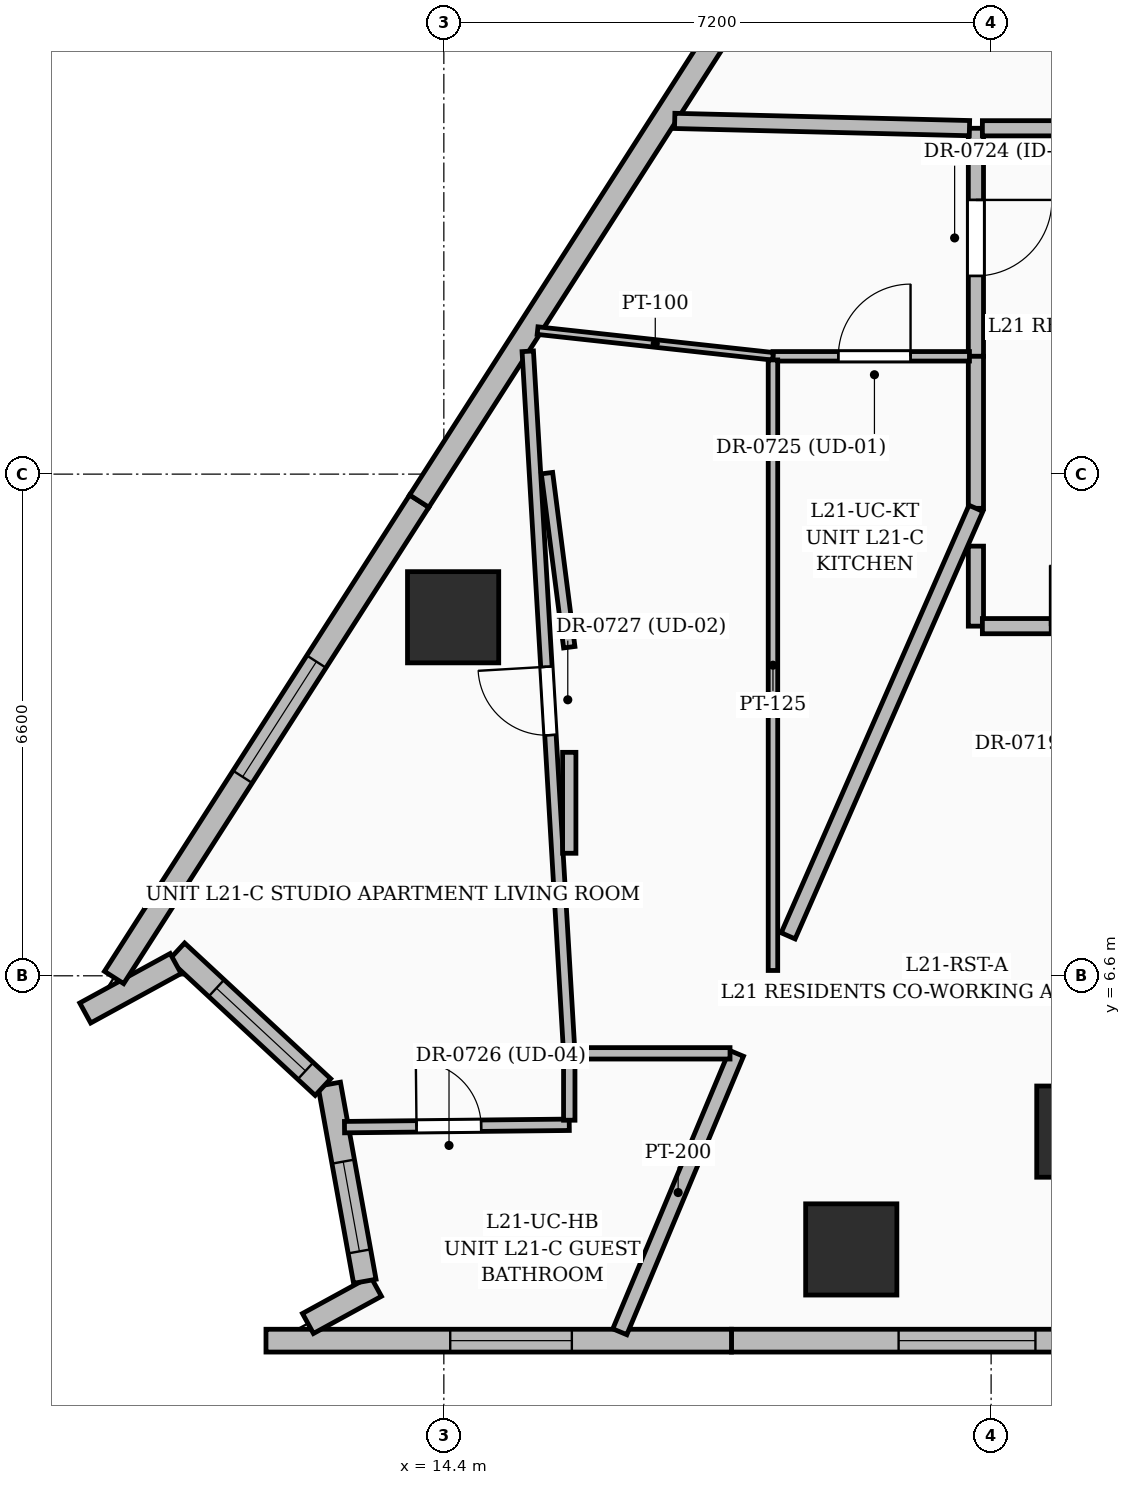
"""IFC4 building model, lengths in metres.
Left out: names, types, materials, properties, quantities, classifications, styles, units other than length and angle.
Written with IfcOpenShell. Run it as: python <this file> out.ifc"""

import sys

from ifc_helpers import new_model, si_unit, direction, frame, frame_2d, origin, origin_2d, place, context, subcontext, project, spatial, rectangle, extrude, element, fill, save


model = new_model("IFC4")
c1 = context("Model", 3, precision=1e-05, world=origin(), true_north=direction((0.0, 1.0)))
c2 = subcontext(c1, "Body", "Model", "MODEL_VIEW")
j1 = project(units=[si_unit("LENGTHUNIT", "METRE"), si_unit("PLANEANGLEUNIT", "RADIAN")], contexts=[c1])
p1 = place(None, origin())
s1 = spatial("IfcSite", under=j1, at=p1, CompositionType="ELEMENT")
p2 = place(p1, origin())
s2 = spatial("IfcBuilding", under=s1, at=p2, CompositionType="ELEMENT")
p3 = place(p2, frame((0.0, 0.0, 85.8)))
s3 = spatial("IfcBuildingStorey", under=s2, at=p3, CompositionType="ELEMENT", Elevation=85.8)
for number, where, z_axis, x_axis in (
    (1, (22.8, 4.55, 0.0), (0.0, 0.0, 1.0), (1.0, 0.0, 0.0)),
    (2, (19.76, 3.0, 0.0), (0.0, 0.0, 1.0), (1.0, 0.0, 0.0)),
    (3, (14.522, 11.317, 0.0), (0.0, 0.0, 1.0), (1.0, 0.0, 0.0)),
):
    element("IfcColumn", number, at=place(p3, frame(where, z_axis=z_axis, x_axis=x_axis)), inside=s3, PredefinedType="COLUMN", context=c2, shape_type="SweptSolid", body=[
        extrude(rectangle(XDim=1.2, YDim=1.2, at=origin_2d()), origin(), (0.0, 0.0, 1.0), 3.6),
    ])
p4 = place(p3, frame((24.308, 1.8, 0.0), z_axis=(0.0, 0.0, 1.0), x_axis=(-1.0, 0.0, 0.0)))
e4 = element("IfcWall", 4, at=p4, inside=s3, PredefinedType="SOLIDWALL", context=c2, shape_type="SweptSolid", body=[
    extrude(rectangle(XDim=6.124, YDim=0.3, at=frame_2d((3.062, 0.0))), origin(), (0.0, 0.0, 1.0), 3.35),
])
p5 = place(p4, frame((2.125, 0.0, 0.6)))
e5 = element("IfcOpeningElement", 5, at=p5, cuts=e4, PredefinedType="OPENING", context=c2, shape_type="SweptSolid", body=[
    extrude(rectangle(XDim=1.8, YDim=2.1, at=frame_2d((0.9, 1.05))), frame((0.0, 0.16, 0.0), z_axis=(0.0, -1.0, 0.0), x_axis=(1.0, 0.0, 0.0)), (0.0, 0.0, 1.0), 0.32),
])
p6 = place(p3, frame((18.184, 1.8, 0.0), z_axis=(0.0, 0.0, 1.0), x_axis=(-1.0, 0.0, 0.0)))
e6 = element("IfcWall", 6, at=p6, inside=s3, PredefinedType="SOLIDWALL", context=c2, shape_type="SweptSolid", body=[
    extrude(rectangle(XDim=6.124, YDim=0.3, at=frame_2d((3.062, 0.0))), origin(), (0.0, 0.0, 1.0), 3.35),
])
p7 = place(p6, frame((2.1, 0.0, 0.55)))
e7 = element("IfcOpeningElement", 7, at=p7, cuts=e6, PredefinedType="OPENING", context=c2, shape_type="SweptSolid", body=[
    extrude(rectangle(XDim=1.6, YDim=2.2, at=frame_2d((0.8, 1.1))), frame((0.0, 0.16, 0.0), z_axis=(0.0, -1.0, 0.0), x_axis=(1.0, 0.0, 0.0)), (0.0, 0.0, 1.0), 0.32),
])
p8 = place(p3, frame((12.612, 2.026, 0.0), z_axis=(0.0, 0.0, 1.0), x_axis=(0.877245120991, 0.480042704036, 0.0)))
e8 = element("IfcWall", 8, at=p8, inside=s3, PredefinedType="SOLIDWALL", context=c2, shape_type="SweptSolid", body=[
    extrude(rectangle(XDim=1.02, YDim=0.3, at=frame_2d((0.51, 0.0))), origin(), (0.0, 0.0, 1.0), 3.35),
])
p9 = place(p3, frame((13.36, 2.581, 0.0), z_axis=(0.0, 0.0, 1.0), x_axis=(-0.177621463404, 0.984098885142, 0.0)))
e9 = element("IfcWall", 9, at=p9, inside=s3, PredefinedType="SOLIDWALL", context=c2, shape_type="SweptSolid", body=[
    extrude(rectangle(XDim=2.635, YDim=0.3, at=frame_2d((1.317, 0.0))), origin(), (0.0, 0.0, 1.0), 3.35),
])
p10 = place(p9, frame((0.4, 0.0, 0.8)))
e10 = element("IfcOpeningElement", 10, at=p10, cuts=e9, PredefinedType="OPENING", context=c2, shape_type="SweptSolid", body=[
    extrude(rectangle(XDim=1.2, YDim=1.8, at=frame_2d((0.6, 0.9))), frame((0.0, 0.16, 0.0), z_axis=(0.0, -1.0, 0.0), x_axis=(1.0, 0.0, 0.0)), (0.0, 0.0, 1.0), 0.32),
])
p11 = place(p3, frame((12.809, 5.136, 0.0), z_axis=(0.0, 0.0, 1.0), x_axis=(-0.732640992678, 0.680615292105, 0.0)))
e11 = element("IfcWall", 11, at=p11, inside=s3, PredefinedType="SOLIDWALL", context=c2, shape_type="SweptSolid", body=[
    extrude(rectangle(XDim=2.623, YDim=0.3, at=frame_2d((1.312, 0.0))), origin(), (0.0, 0.0, 1.0), 3.35),
])
p12 = place(p11, frame((0.313, 0.0, 0.55)))
e12 = element("IfcOpeningElement", 12, at=p12, cuts=e11, PredefinedType="OPENING", context=c2, shape_type="SweptSolid", body=[
    extrude(rectangle(XDim=1.6, YDim=2.2, at=frame_2d((0.8, 1.1))), frame((0.0, 0.16, 0.0), z_axis=(0.0, -1.0, 0.0), x_axis=(1.0, 0.0, 0.0)), (0.0, 0.0, 1.0), 0.32),
])
p13 = place(p3, frame((10.872, 6.761, 0.0), z_axis=(0.0, 0.0, 1.0), x_axis=(-0.877399567967, -0.479760354898, 0.0)))
e13 = element("IfcWall", 13, at=p13, inside=s3, PredefinedType="SOLIDWALL", context=c2, shape_type="SweptSolid", body=[
    extrude(rectangle(XDim=1.356, YDim=0.3, at=frame_2d((0.678, 0.0))), origin(), (0.0, 0.0, 1.0), 3.35),
])
p14 = place(p3, frame((10.061, 6.578, 0.0), z_axis=(0.0, 0.0, 1.0), x_axis=(0.539445524224, 0.84202050236, 0.0)))
e14 = element("IfcWall", 14, at=p14, inside=s3, PredefinedType="SOLIDWALL", context=c2, shape_type="SweptSolid", body=[
    extrude(rectangle(XDim=7.443, YDim=0.3, at=frame_2d((3.721, 0.0))), origin(), (0.0, 0.0, 1.0), 3.35),
])
p15 = place(p14, frame((3.135, 0.0, 0.6)))
e15 = element("IfcOpeningElement", 15, at=p15, cuts=e14, PredefinedType="OPENING", context=c2, shape_type="SweptSolid", body=[
    extrude(rectangle(XDim=1.8, YDim=2.1, at=frame_2d((0.9, 1.05))), frame((0.0, 0.16, 0.0), z_axis=(0.0, -1.0, 0.0), x_axis=(1.0, 0.0, 0.0)), (0.0, 0.0, 1.0), 0.32),
])
p16 = place(p3, frame((14.076, 12.845, 0.0), z_axis=(0.0, 0.0, 1.0), x_axis=(0.539449144613, 0.842018182925, 0.0)))
e16 = element("IfcWall", 16, at=p16, inside=s3, PredefinedType="SOLIDWALL", context=c2, shape_type="SweptSolid", body=[
    extrude(rectangle(XDim=8.058, YDim=0.3, at=frame_2d((4.029, 0.0))), origin(), (0.0, 0.0, 1.0), 3.35),
])
p17 = place(p3, frame((21.4, 12.253, 0.0), z_axis=(0.0, 0.0, 1.0), x_axis=(0.0, -1.0, 0.0)))
e17 = element("IfcWall", 17, at=p17, inside=s3, PredefinedType="PARTITIONING", context=c2, shape_type="SweptSolid", body=[
    extrude(rectangle(XDim=1.053, YDim=0.2, at=frame_2d((0.526, 0.0))), origin(), (0.0, 0.0, 1.0), 3.35),
])
p18 = place(p3, frame((21.485, 11.2, 0.0), z_axis=(0.0, 0.0, 1.0), x_axis=(1.0, 0.0, 0.0)))
e18 = element("IfcWall", 18, at=p18, inside=s3, PredefinedType="PARTITIONING", context=c2, shape_type="SweptSolid", body=[
    extrude(rectangle(XDim=3.384, YDim=0.2, at=frame_2d((1.692, 0.0))), origin(), (0.0, 0.0, 1.0), 3.35),
])
p19 = place(p18, frame((0.89, 0.0, 0.0)))
e19 = element("IfcOpeningElement", 19, at=p19, cuts=e18, PredefinedType="OPENING", context=c2, shape_type="SweptSolid", body=[
    extrude(rectangle(XDim=1.6, YDim=2.3, at=frame_2d((0.8, 1.15))), frame((0.0, 0.11, 0.0), z_axis=(0.0, -1.0, 0.0), x_axis=(1.0, 0.0, 0.0)), (0.0, 0.0, 1.0), 0.22),
])
p20 = place(p3, frame((21.4, 17.75, 0.0), z_axis=(0.0, 0.0, 1.0), x_axis=(0.0, -1.0, 0.0)))
e20 = element("IfcWall", 20, at=p20, inside=s3, PredefinedType="PARTITIONING", context=c2, shape_type="SweptSolid", body=[
    extrude(rectangle(XDim=3.0, YDim=0.2, at=frame_2d((1.5, 0.0))), origin(), (0.0, 0.0, 1.0), 2.712),
])
p21 = place(p20, frame((0.943, 0.0, 0.0)))
e21 = element("IfcOpeningElement", 21, at=p21, cuts=e20, PredefinedType="OPENING", context=c2, shape_type="SweptSolid", body=[
    extrude(rectangle(XDim=1.0, YDim=2.2, at=frame_2d((0.5, 1.1))), frame((0.0, 0.11, 0.0), z_axis=(0.0, -1.0, 0.0), x_axis=(1.0, 0.0, 0.0)), (0.0, 0.0, 1.0), 0.22),
])
p22 = place(p3, frame((21.4, 14.75, 0.0), z_axis=(0.0, 0.0, 1.0), x_axis=(0.0, -1.0, 0.0)))
e22 = element("IfcWall", 22, at=p22, inside=s3, PredefinedType="PARTITIONING", context=c2, shape_type="SweptSolid", body=[
    extrude(rectangle(XDim=2.0, YDim=0.2, at=frame_2d((1.0, 0.0))), origin(), (0.0, 0.0, 1.0), 2.712),
])
p23 = place(p3, frame((27.37, 17.75, 0.0), z_axis=(0.0, 0.0, 1.0), x_axis=(-1.0, 0.0, 0.0)))
e23 = element("IfcWall", 23, at=p23, inside=s3, PredefinedType="PARTITIONING", context=c2, shape_type="SweptSolid", body=[
    extrude(rectangle(XDim=5.885, YDim=0.2, at=frame_2d((2.942, 0.0))), origin(), (0.0, 0.0, 1.0), 2.345),
])
p24 = place(p23, frame((2.127, 0.0, 0.0)))
e24 = element("IfcOpeningElement", 24, at=p24, cuts=e23, PredefinedType="OPENING", context=c2, shape_type="SweptSolid", body=[
    extrude(rectangle(XDim=1.6, YDim=2.3, at=frame_2d((0.8, 1.15))), frame((0.0, 0.11, 0.0), z_axis=(0.0, -1.0, 0.0), x_axis=(1.0, 0.0, 0.0)), (0.0, 0.0, 1.0), 0.22),
])
p25 = place(p3, frame((18.25, 5.58, 0.0), z_axis=(0.0, 0.0, 1.0), x_axis=(-0.386465274931, -0.922303958179, 0.0)))
e25 = element("IfcWall", 25, at=p25, inside=s3, PredefinedType="PARTITIONING", context=c2, shape_type="SweptSolid", body=[
    extrude(rectangle(XDim=3.972, YDim=0.2, at=frame_2d((1.986, 0.0))), origin(), (0.0, 0.0, 1.0), 2.37),
])
p26 = place(p3, frame((21.4, 12.75, 0.0), z_axis=(0.0, 0.0, 1.0), x_axis=(-0.402081895534, -0.915603707553, 0.0)))
e26 = element("IfcWall", 26, at=p26, inside=s3, PredefinedType="PARTITIONING", context=c2, shape_type="SweptSolid", body=[
    extrude(rectangle(XDim=6.143, YDim=0.2, at=frame_2d((3.072, 0.0))), origin(), (0.0, 0.0, 1.0), 2.345),
])
p27 = place(p3, frame((13.093, 4.609, 0.0), z_axis=(0.0, 0.0, 1.0), x_axis=(0.999945032003, 0.010484892591, 0.0)))
e27 = element("IfcWall", 27, at=p27, inside=s3, PredefinedType="PARTITIONING", context=c2, shape_type="SweptSolid", body=[
    extrude(rectangle(XDim=2.957, YDim=0.15, at=frame_2d((1.479, 0.0))), origin(), (0.0, 0.0, 1.0), 3.35),
])
p28 = place(p27, frame((0.948, 0.0, 0.0)))
e28 = element("IfcOpeningElement", 28, at=p28, cuts=e27, PredefinedType="OPENING", context=c2, shape_type="SweptSolid", body=[
    extrude(rectangle(XDim=0.85, YDim=2.1, at=frame_2d((0.425, 1.05))), frame((0.0, 0.085, 0.0), z_axis=(0.0, -1.0, 0.0), x_axis=(1.0, 0.0, 0.0)), (0.0, 0.0, 1.0), 0.17),
])
p29 = place(p3, frame((16.05, 4.7, 0.0), z_axis=(0.0, 0.0, 1.0), x_axis=(0.0, 1.0, 0.0)))
e29 = element("IfcWall", 29, at=p29, inside=s3, PredefinedType="PARTITIONING", context=c2, shape_type="SweptSolid", body=[
    extrude(rectangle(XDim=0.88, YDim=0.15, at=frame_2d((0.44, 0.0))), origin(), (0.0, 0.0, 1.0), 3.35),
])
p30 = place(p3, frame((18.73, 14.75, 0.0), z_axis=(0.0, 0.0, 1.0), x_axis=(1.0, 0.0, 0.0)))
e30 = element("IfcWall", 30, at=p30, inside=s3, PredefinedType="PARTITIONING", context=c2, shape_type="SweptSolid", body=[
    extrude(rectangle(XDim=2.585, YDim=0.125, at=frame_2d((1.292, 0.0))), origin(), (0.0, 0.0, 1.0), 2.712),
])
p31 = place(p30, frame((0.86, 0.0, 0.0)))
e31 = element("IfcOpeningElement", 31, at=p31, cuts=e30, PredefinedType="OPENING", context=c2, shape_type="SweptSolid", body=[
    extrude(rectangle(XDim=0.95, YDim=2.2, at=frame_2d((0.475, 1.1))), frame((0.0, 0.072, 0.0), z_axis=(0.0, -1.0, 0.0), x_axis=(1.0, 0.0, 0.0)), (0.0, 0.0, 1.0), 0.145),
])
p32 = place(p3, frame((16.05, 5.58, 0.0), z_axis=(0.0, 0.0, 1.0), x_axis=(-0.059029848267, 0.998256218119, 0.0)))
e32 = element("IfcWall", 32, at=p32, inside=s3, PredefinedType="PARTITIONING", context=c2, shape_type="SweptSolid", body=[
    extrude(rectangle(XDim=9.252, YDim=0.15, at=frame_2d((4.626, 0.0))), origin(), (0.0, 0.0, 1.0), 2.345),
])
p33 = place(p32, frame((4.194, 0.0, 0.0)))
e33 = element("IfcOpeningElement", 33, at=p33, cuts=e32, PredefinedType="OPENING", context=c2, shape_type="SweptSolid", body=[
    extrude(rectangle(XDim=0.9, YDim=2.15, at=frame_2d((0.45, 1.075))), frame((0.0, 0.085, 0.0), z_axis=(0.0, -1.0, 0.0), x_axis=(1.0, 0.0, 0.0)), (0.0, 0.0, 1.0), 0.17),
])
p34 = place(p3, frame((15.633, 15.088, 0.0), z_axis=(0.0, 0.0, 1.0), x_axis=(0.994100640379, -0.108461591351, 0.0)))
e34 = element("IfcWall", 34, at=p34, inside=s3, PredefinedType="PARTITIONING", context=c2, shape_type="SweptSolid", body=[
    extrude(rectangle(XDim=3.115, YDim=0.1, at=frame_2d((1.558, 0.0))), origin(), (0.0, 0.0, 1.0), 2.37),
])
p35 = place(p3, frame((21.315, 17.752, 0.0), z_axis=(0.0, 0.0, 1.0), x_axis=(-0.999698711084, 0.024545611768, 0.0)))
e35 = element("IfcWall", 35, at=p35, inside=s3, PredefinedType="PARTITIONING", context=c2, shape_type="SweptSolid", body=[
    extrude(rectangle(XDim=3.879, YDim=0.2, at=frame_2d((1.939, 0.0))), origin(), (0.0, 0.0, 1.0), 2.37),
])
p36 = place(p3, frame((18.165, 5.58, 0.0), z_axis=(0.0, 0.0, 1.0), x_axis=(-1.0, 0.0, 0.0)))
e36 = element("IfcWall", 36, at=p36, inside=s3, PredefinedType="PARTITIONING", context=c2, shape_type="SweptSolid", body=[
    extrude(rectangle(XDim=2.055, YDim=0.15, at=frame_2d((1.027, 0.0))), origin(), (0.0, 0.0, 1.0), 2.37),
])
p37 = place(p3, frame((18.73, 14.702, 0.0), z_axis=(0.0, 0.0, 1.0), x_axis=(0.0, -1.0, 0.0)))
e37 = element("IfcWall", 37, at=p37, inside=s3, PredefinedType="PARTITIONING", context=c2, shape_type="SweptSolid", body=[
    extrude(rectangle(XDim=8.032, YDim=0.125, at=frame_2d((4.016, 0.0))), origin(), (0.0, 0.0, 1.0), 2.345),
])
p38 = place(p3, frame((16.05, 8.212, 0.0), z_axis=(0.0, 0.0, 1.0), x_axis=(0.0, 1.0, 0.0)))
e38 = element("IfcWall", 38, at=p38, inside=s3, PredefinedType="PARTITIONING", context=c2, shape_type="SweptSolid", body=[
    extrude(rectangle(XDim=1.328, YDim=0.175, at=frame_2d((0.664, 0.0))), origin(), (0.0, 0.0, 1.0), 2.37),
])
p39 = place(p3, frame((16.05, 10.923, 0.0), z_axis=(0.0, 0.0, 1.0), x_axis=(-0.126910859519, 0.99191412619, 0.0)))
e39 = element("IfcWall", 39, at=p39, inside=s3, PredefinedType="PARTITIONING", context=c2, shape_type="SweptSolid", body=[
    extrude(rectangle(XDim=2.308, YDim=0.15, at=frame_2d((1.154, 0.0))), origin(), (0.0, 0.0, 1.0), 2.345),
])
p40 = place(p5, origin())
e40 = element("IfcWindow", 40, at=p40, inside=s3, PartitioningType="SINGLE_PANEL", PredefinedType="WINDOW", context=c2, shape_type="SweptSolid", body=[
    extrude(rectangle(XDim=1.8, YDim=2.1, at=frame_2d((0.9, 1.05))), frame((0.0, 0.03, 0.0), z_axis=(0.0, -1.0, 0.0), x_axis=(1.0, 0.0, 0.0)), (0.0, 0.0, 1.0), 0.06),
])
fill(e5, e40)
p41 = place(p7, origin())
e41 = element("IfcWindow", 41, at=p41, inside=s3, PartitioningType="SINGLE_PANEL", PredefinedType="WINDOW", context=c2, shape_type="SweptSolid", body=[
    extrude(rectangle(XDim=1.6, YDim=2.2, at=frame_2d((0.8, 1.1))), frame((0.0, 0.03, 0.0), z_axis=(0.0, -1.0, 0.0), x_axis=(1.0, 0.0, 0.0)), (0.0, 0.0, 1.0), 0.06),
])
fill(e7, e41)
p42 = place(p10, origin())
e42 = element("IfcWindow", 42, at=p42, inside=s3, PartitioningType="SINGLE_PANEL", PredefinedType="WINDOW", context=c2, shape_type="SweptSolid", body=[
    extrude(rectangle(XDim=1.2, YDim=1.8, at=frame_2d((0.6, 0.9))), frame((0.0, 0.03, 0.0), z_axis=(0.0, -1.0, 0.0), x_axis=(1.0, 0.0, 0.0)), (0.0, 0.0, 1.0), 0.06),
])
fill(e10, e42)
p43 = place(p12, origin())
e43 = element("IfcWindow", 43, at=p43, inside=s3, PartitioningType="SINGLE_PANEL", PredefinedType="WINDOW", context=c2, shape_type="SweptSolid", body=[
    extrude(rectangle(XDim=1.6, YDim=2.2, at=frame_2d((0.8, 1.1))), frame((0.0, 0.03, 0.0), z_axis=(0.0, -1.0, 0.0), x_axis=(1.0, 0.0, 0.0)), (0.0, 0.0, 1.0), 0.06),
])
fill(e12, e43)
p44 = place(p15, origin())
e44 = element("IfcWindow", 44, at=p44, inside=s3, PartitioningType="SINGLE_PANEL", PredefinedType="WINDOW", context=c2, shape_type="SweptSolid", body=[
    extrude(rectangle(XDim=1.8, YDim=2.1, at=frame_2d((0.9, 1.05))), frame((0.0, 0.03, 0.0), z_axis=(0.0, -1.0, 0.0), x_axis=(1.0, 0.0, 0.0)), (0.0, 0.0, 1.0), 0.06),
])
fill(e15, e44)
p45 = place(p19, origin())
e45 = element("IfcDoor", 45, at=p45, inside=s3, OperationType="DOUBLE_DOOR_SINGLE_SWING", PredefinedType="DOOR", context=c2, shape_type="SweptSolid", body=[
    extrude(rectangle(XDim=1.6, YDim=2.3, at=frame_2d((0.8, 1.15))), frame((0.0, 0.025, 0.0), z_axis=(0.0, -1.0, 0.0), x_axis=(1.0, 0.0, 0.0)), (0.0, 0.0, 1.0), 0.05),
])
fill(e19, e45)
p46 = place(p21, origin())
e46 = element("IfcDoor", 46, at=p46, inside=s3, OperationType="SINGLE_SWING_LEFT", PredefinedType="DOOR", context=c2, shape_type="SweptSolid", body=[
    extrude(rectangle(XDim=1.0, YDim=2.2, at=frame_2d((0.5, 1.1))), frame((0.0, 0.025, 0.0), z_axis=(0.0, -1.0, 0.0), x_axis=(1.0, 0.0, 0.0)), (0.0, 0.0, 1.0), 0.05),
])
fill(e21, e46)
p47 = place(p31, origin())
e47 = element("IfcDoor", 47, at=p47, inside=s3, OperationType="SINGLE_SWING_RIGHT", PredefinedType="DOOR", context=c2, shape_type="SweptSolid", body=[
    extrude(rectangle(XDim=0.95, YDim=2.2, at=frame_2d((0.475, 1.1))), frame((0.0, 0.025, 0.0), z_axis=(0.0, -1.0, 0.0), x_axis=(1.0, 0.0, 0.0)), (0.0, 0.0, 1.0), 0.05),
])
fill(e31, e47)
p48 = place(p28, origin())
e48 = element("IfcDoor", 48, at=p48, inside=s3, OperationType="SINGLE_SWING_LEFT", PredefinedType="DOOR", context=c2, shape_type="SweptSolid", body=[
    extrude(rectangle(XDim=0.85, YDim=2.1, at=frame_2d((0.425, 1.05))), frame((0.0, 0.025, 0.0), z_axis=(0.0, -1.0, 0.0), x_axis=(1.0, 0.0, 0.0)), (0.0, 0.0, 1.0), 0.05),
])
fill(e28, e48)
p49 = place(p33, origin())
e49 = element("IfcDoor", 49, at=p49, inside=s3, OperationType="SINGLE_SWING_RIGHT", PredefinedType="DOOR", context=c2, shape_type="SweptSolid", body=[
    extrude(rectangle(XDim=0.9, YDim=2.15, at=frame_2d((0.45, 1.075))), frame((0.0, 0.025, 0.0), z_axis=(0.0, -1.0, 0.0), x_axis=(1.0, 0.0, 0.0)), (0.0, 0.0, 1.0), 0.05),
])
fill(e33, e49)
save(model, sys.argv[1])
